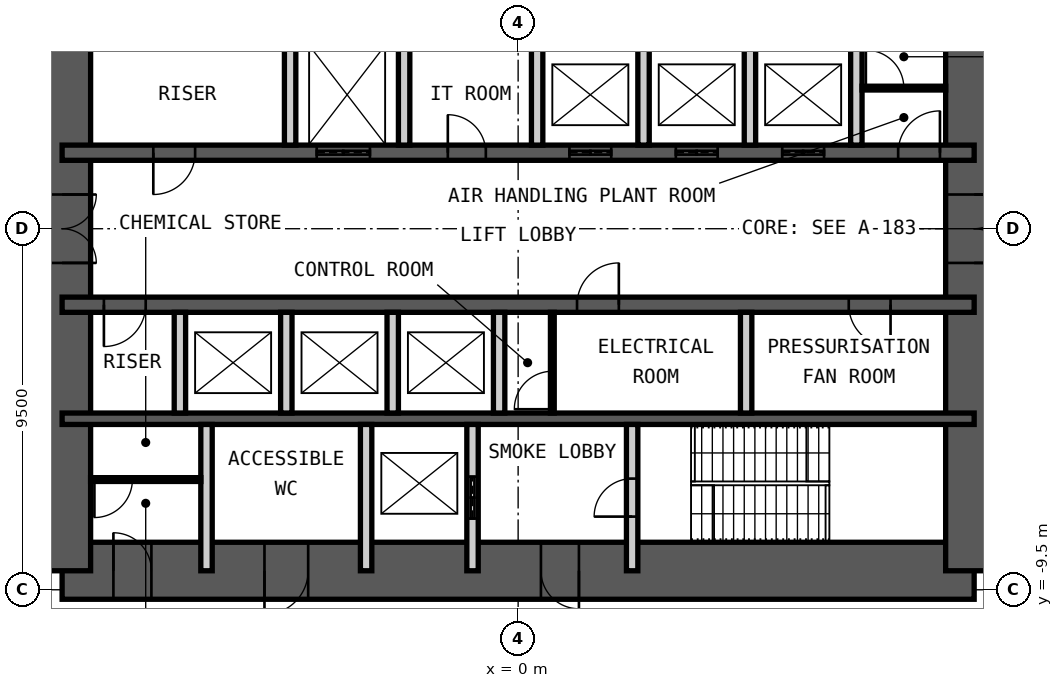
"""IFC4 building model, lengths in metres.
Left out: names, types, materials, properties, quantities, classifications, styles, units other than length and angle.
Written with IfcOpenShell. Run it as: python <this file> out.ifc"""

import sys

from ifc_helpers import new_model, si_unit, direction, frame, frame_2d, origin, place, context, subcontext, project, spatial, rectangle, extrude, element, fill, save


model = new_model("IFC4")
c1 = context("Model", 3, precision=1e-05, world=origin(), true_north=direction((0.0, 1.0)))
c2 = subcontext(c1, "Body", "Model", "MODEL_VIEW")
j1 = project(units=[si_unit("LENGTHUNIT", "METRE"), si_unit("PLANEANGLEUNIT", "RADIAN")], contexts=[c1])
p1 = place(None, origin())
s1 = spatial("IfcSite", under=j1, at=p1, CompositionType="ELEMENT")
p2 = place(p1, origin())
s2 = spatial("IfcBuilding", under=s1, at=p2, CompositionType="ELEMENT")
p3 = place(p2, frame((0.0, 0.0, 62.0)))
s3 = spatial("IfcBuildingStorey", under=s2, at=p3, CompositionType="ELEMENT", Elevation=62.0)
p4 = place(p3, frame((-12.0, -9.0, 0.0), z_axis=(0.0, 0.0, 1.0), x_axis=(1.0, 0.0, 0.0)))
e1 = element("IfcWall", 1, at=p4, inside=s3, PredefinedType="SHEAR", context=c2, shape_type="SweptSolid", body=[
    extrude(rectangle(XDim=24.0, YDim=1.5, at=frame_2d((12.0, 0.0))), origin(), (0.0, 0.0, 1.0), 5.0),
])
p5 = place(p4, frame((1.35, 0.0, 0.0)))
e2 = element("IfcOpeningElement", 2, at=p5, cuts=e1, PredefinedType="OPENING", context=c2, shape_type="SweptSolid", body=[
    extrude(rectangle(XDim=1.0, YDim=2.1, at=frame_2d((0.5, 1.05))), frame((0.0, 0.76, 0.0), z_axis=(0.0, -1.0, 0.0), x_axis=(1.0, 0.0, 0.0)), (0.0, 0.0, 1.0), 1.52),
])
p6 = place(p4, frame((5.325, 0.0, 0.0)))
e3 = element("IfcOpeningElement", 3, at=p6, cuts=e1, PredefinedType="OPENING", context=c2, shape_type="SweptSolid", body=[
    extrude(rectangle(XDim=1.15, YDim=2.1, at=frame_2d((0.575, 1.05))), frame((0.0, 0.76, 0.0), z_axis=(0.0, -1.0, 0.0), x_axis=(1.0, 0.0, 0.0)), (0.0, 0.0, 1.0), 1.52),
])
p7 = place(p4, frame((12.6, 0.0, 0.0)))
e4 = element("IfcOpeningElement", 4, at=p7, cuts=e1, PredefinedType="OPENING", context=c2, shape_type="SweptSolid", body=[
    extrude(rectangle(XDim=1.0, YDim=2.1, at=frame_2d((0.5, 1.05))), frame((0.0, 0.76, 0.0), z_axis=(0.0, -1.0, 0.0), x_axis=(1.0, 0.0, 0.0)), (0.0, 0.0, 1.0), 1.52),
])
p8 = place(p3, frame((12.0, -9.0, 0.0), z_axis=(0.0, 0.0, 1.0), x_axis=(0.0, 1.0, 0.0)))
e5 = element("IfcWall", 5, at=p8, inside=s3, PredefinedType="SHEAR", context=c2, shape_type="SweptSolid", body=[
    extrude(rectangle(XDim=18.0, YDim=1.5, at=frame_2d((9.0, 0.0))), origin(), (0.0, 0.0, 1.0), 5.0),
])
p9 = place(p8, frame((8.1, 0.0, 0.0)))
e6 = element("IfcOpeningElement", 6, at=p9, cuts=e5, PredefinedType="OPENING", context=c2, shape_type="SweptSolid", body=[
    extrude(rectangle(XDim=1.8, YDim=2.1, at=frame_2d((0.9, 1.05))), frame((0.0, 0.76, 0.0), z_axis=(0.0, -1.0, 0.0), x_axis=(1.0, 0.0, 0.0)), (0.0, 0.0, 1.0), 1.52),
])
p10 = place(p3, frame((-12.0, -9.0, 0.0), z_axis=(0.0, 0.0, 1.0), x_axis=(0.0, 1.0, 0.0)))
e7 = element("IfcWall", 7, at=p10, inside=s3, PredefinedType="SHEAR", context=c2, shape_type="SweptSolid", body=[
    extrude(rectangle(XDim=18.0, YDim=1.5, at=frame_2d((9.0, 0.0))), origin(), (0.0, 0.0, 1.0), 5.0),
])
p11 = place(p10, frame((8.1, 0.0, 0.0)))
e8 = element("IfcOpeningElement", 8, at=p11, cuts=e7, PredefinedType="OPENING", context=c2, shape_type="SweptSolid", body=[
    extrude(rectangle(XDim=1.8, YDim=2.1, at=frame_2d((0.9, 1.05))), frame((0.0, 0.76, 0.0), z_axis=(0.0, -1.0, 0.0), x_axis=(1.0, 0.0, 0.0)), (0.0, 0.0, 1.0), 1.52),
])
p12 = place(p3, frame((-12.0, 2.0, 0.0), z_axis=(0.0, 0.0, 1.0), x_axis=(1.0, 0.0, 0.0)))
e9 = element("IfcWall", 9, at=p12, inside=s3, PredefinedType="SHEAR", context=c2, shape_type="SweptSolid", body=[
    extrude(rectangle(XDim=24.0, YDim=0.4, at=frame_2d((12.0, 0.0))), origin(), (0.0, 0.0, 1.0), 5.0),
])
p13 = place(p12, frame((2.4, 0.0, 0.0)))
e10 = element("IfcOpeningElement", 10, at=p13, cuts=e9, PredefinedType="OPENING", context=c2, shape_type="SweptSolid", body=[
    extrude(rectangle(XDim=1.1, YDim=2.1, at=frame_2d((0.55, 1.05))), frame((0.0, 0.21, 0.0), z_axis=(0.0, -1.0, 0.0), x_axis=(1.0, 0.0, 0.0)), (0.0, 0.0, 1.0), 0.42),
])
p14 = place(p12, frame((22.0, 0.0, 0.0)))
e11 = element("IfcOpeningElement", 11, at=p14, cuts=e9, PredefinedType="OPENING", context=c2, shape_type="SweptSolid", body=[
    extrude(rectangle(XDim=1.1, YDim=2.1, at=frame_2d((0.55, 1.05))), frame((0.0, 0.21, 0.0), z_axis=(0.0, -1.0, 0.0), x_axis=(1.0, 0.0, 0.0)), (0.0, 0.0, 1.0), 0.42),
])
p15 = place(p12, frame((10.15, 0.0, 0.0)))
e12 = element("IfcOpeningElement", 12, at=p15, cuts=e9, PredefinedType="OPENING", context=c2, shape_type="SweptSolid", body=[
    extrude(rectangle(XDim=1.0, YDim=2.1, at=frame_2d((0.5, 1.05))), frame((0.0, 0.21, 0.0), z_axis=(0.0, -1.0, 0.0), x_axis=(1.0, 0.0, 0.0)), (0.0, 0.0, 1.0), 0.42),
])
p16 = place(p12, frame((6.7, 0.0, 0.0)))
e13 = element("IfcOpeningElement", 13, at=p16, cuts=e9, PredefinedType="OPENING", context=c2, shape_type="SweptSolid", body=[
    extrude(rectangle(XDim=1.4, YDim=2.4, at=frame_2d((0.7, 1.2))), frame((0.0, 0.21, 0.0), z_axis=(0.0, -1.0, 0.0), x_axis=(1.0, 0.0, 0.0)), (0.0, 0.0, 1.0), 0.42),
])
p17 = place(p12, frame((13.35, 0.0, 0.0)))
e14 = element("IfcOpeningElement", 14, at=p17, cuts=e9, PredefinedType="OPENING", context=c2, shape_type="SweptSolid", body=[
    extrude(rectangle(XDim=1.1, YDim=2.4, at=frame_2d((0.55, 1.2))), frame((0.0, 0.21, 0.0), z_axis=(0.0, -1.0, 0.0), x_axis=(1.0, 0.0, 0.0)), (0.0, 0.0, 1.0), 0.42),
])
p18 = place(p12, frame((16.15, 0.0, 0.0)))
e15 = element("IfcOpeningElement", 15, at=p18, cuts=e9, PredefinedType="OPENING", context=c2, shape_type="SweptSolid", body=[
    extrude(rectangle(XDim=1.1, YDim=2.4, at=frame_2d((0.55, 1.2))), frame((0.0, 0.21, 0.0), z_axis=(0.0, -1.0, 0.0), x_axis=(1.0, 0.0, 0.0)), (0.0, 0.0, 1.0), 0.42),
])
p19 = place(p12, frame((18.95, 0.0, 0.0)))
e16 = element("IfcOpeningElement", 16, at=p19, cuts=e9, PredefinedType="OPENING", context=c2, shape_type="SweptSolid", body=[
    extrude(rectangle(XDim=1.1, YDim=2.4, at=frame_2d((0.55, 1.2))), frame((0.0, 0.21, 0.0), z_axis=(0.0, -1.0, 0.0), x_axis=(1.0, 0.0, 0.0)), (0.0, 0.0, 1.0), 0.42),
])
p20 = place(p3, frame((-12.0, -2.0, 0.0), z_axis=(0.0, 0.0, 1.0), x_axis=(1.0, 0.0, 0.0)))
e17 = element("IfcWall", 17, at=p20, inside=s3, PredefinedType="SHEAR", context=c2, shape_type="SweptSolid", body=[
    extrude(rectangle(XDim=24.0, YDim=0.4, at=frame_2d((12.0, 0.0))), origin(), (0.0, 0.0, 1.0), 5.0),
])
p21 = place(p20, frame((1.1, 0.0, 0.0)))
e18 = element("IfcOpeningElement", 18, at=p21, cuts=e17, PredefinedType="OPENING", context=c2, shape_type="SweptSolid", body=[
    extrude(rectangle(XDim=1.1, YDim=2.1, at=frame_2d((0.55, 1.05))), frame((0.0, 0.21, 0.0), z_axis=(0.0, -1.0, 0.0), x_axis=(1.0, 0.0, 0.0)), (0.0, 0.0, 1.0), 0.42),
])
p22 = place(p20, frame((13.55, 0.0, 0.0)))
e19 = element("IfcOpeningElement", 19, at=p22, cuts=e17, PredefinedType="OPENING", context=c2, shape_type="SweptSolid", body=[
    extrude(rectangle(XDim=1.1, YDim=2.1, at=frame_2d((0.55, 1.05))), frame((0.0, 0.21, 0.0), z_axis=(0.0, -1.0, 0.0), x_axis=(1.0, 0.0, 0.0)), (0.0, 0.0, 1.0), 0.42),
])
p23 = place(p20, frame((20.7, 0.0, 0.0)))
e20 = element("IfcOpeningElement", 20, at=p23, cuts=e17, PredefinedType="OPENING", context=c2, shape_type="SweptSolid", body=[
    extrude(rectangle(XDim=1.1, YDim=2.1, at=frame_2d((0.55, 1.05))), frame((0.0, 0.21, 0.0), z_axis=(0.0, -1.0, 0.0), x_axis=(1.0, 0.0, 0.0)), (0.0, 0.0, 1.0), 0.42),
])
p24 = place(p3, frame((-12.0, -5.0, 0.0), z_axis=(0.0, 0.0, 1.0), x_axis=(1.0, 0.0, 0.0)))
e21 = element("IfcWall", 21, at=p24, inside=s3, PredefinedType="SHEAR", context=c2, shape_type="SweptSolid", body=[
    extrude(rectangle(XDim=24.0, YDim=0.3, at=frame_2d((12.0, 0.0))), origin(), (0.0, 0.0, 1.0), 5.0),
])
for number, where, z_axis, x_axis in (
    (22, (-6.0, 2.2, 0.0), (0.0, 0.0, 1.0), (0.0, 1.0, 0.0)),
    (23, (-3.0, 2.2, 0.0), (0.0, 0.0, 1.0), (0.0, 1.0, 0.0)),
    (24, (0.5, 2.2, 0.0), (0.0, 0.0, 1.0), (0.0, 1.0, 0.0)),
    (25, (3.3, 2.2, 0.0), (0.0, 0.0, 1.0), (0.0, 1.0, 0.0)),
    (26, (6.1, 2.2, 0.0), (0.0, 0.0, 1.0), (0.0, 1.0, 0.0)),
    (27, (8.9, 2.2, 0.0), (0.0, 0.0, 1.0), (0.0, 1.0, 0.0)),
    (28, (-8.9, -4.85, 0.0), (0.0, 0.0, 1.0), (0.0, 1.0, 0.0)),
    (29, (-6.1, -4.85, 0.0), (0.0, 0.0, 1.0), (0.0, 1.0, 0.0)),
    (30, (-3.3, -4.85, 0.0), (0.0, 0.0, 1.0), (0.0, 1.0, 0.0)),
    (31, (-0.5, -4.85, 0.0), (0.0, 0.0, 1.0), (0.0, 1.0, 0.0)),
    (32, (6.0, -4.85, 0.0), (0.0, 0.0, 1.0), (0.0, 1.0, 0.0)),
):
    element("IfcWall", number, at=place(p3, frame(where, z_axis=z_axis, x_axis=x_axis)), inside=s3, PredefinedType="PARTITIONING", context=c2, shape_type="SweptSolid", body=[
        extrude(rectangle(XDim=2.65, YDim=0.3, at=frame_2d((1.325, 0.0))), origin(), (0.0, 0.0, 1.0), 4.78),
    ])
for number, where, z_axis, x_axis in (
    (33, (-8.2, -9.0, 0.0), (0.0, 0.0, 1.0), (0.0, 1.0, 0.0)),
    (34, (-4.0, -9.0, 0.0), (0.0, 0.0, 1.0), (0.0, 1.0, 0.0)),
):
    element("IfcWall", number, at=place(p3, frame(where, z_axis=z_axis, x_axis=x_axis)), inside=s3, PredefinedType="PARTITIONING", context=c2, shape_type="SweptSolid", body=[
        extrude(rectangle(XDim=3.85, YDim=0.3, at=frame_2d((1.925, 0.0))), origin(), (0.0, 0.0, 1.0), 4.78),
    ])
p25 = place(p3, frame((-1.2, -9.0, 0.0), z_axis=(0.0, 0.0, 1.0), x_axis=(0.0, 1.0, 0.0)))
e35 = element("IfcWall", 35, at=p25, inside=s3, PredefinedType="PARTITIONING", context=c2, shape_type="SweptSolid", body=[
    extrude(rectangle(XDim=3.85, YDim=0.3, at=frame_2d((1.925, 0.0))), origin(), (0.0, 0.0, 1.0), 4.78),
])
p26 = place(p25, frame((1.375, 0.0, 0.0)))
e36 = element("IfcOpeningElement", 36, at=p26, cuts=e35, PredefinedType="OPENING", context=c2, shape_type="SweptSolid", body=[
    extrude(rectangle(XDim=1.1, YDim=2.4, at=frame_2d((0.55, 1.2))), frame((0.0, 0.16, 0.0), z_axis=(0.0, -1.0, 0.0), x_axis=(1.0, 0.0, 0.0)), (0.0, 0.0, 1.0), 0.32),
])
p27 = place(p3, frame((3.0, -9.0, 0.0), z_axis=(0.0, 0.0, 1.0), x_axis=(0.0, 1.0, 0.0)))
e37 = element("IfcWall", 37, at=p27, inside=s3, PredefinedType="PARTITIONING", context=c2, shape_type="SweptSolid", body=[
    extrude(rectangle(XDim=3.85, YDim=0.3, at=frame_2d((1.925, 0.0))), origin(), (0.0, 0.0, 1.0), 4.78),
])
p28 = place(p27, frame((1.425, 0.0, 0.0)))
e38 = element("IfcOpeningElement", 38, at=p28, cuts=e37, PredefinedType="OPENING", context=c2, shape_type="SweptSolid", body=[
    extrude(rectangle(XDim=1.0, YDim=2.1, at=frame_2d((0.5, 1.05))), frame((0.0, 0.16, 0.0), z_axis=(0.0, -1.0, 0.0), x_axis=(1.0, 0.0, 0.0)), (0.0, 0.0, 1.0), 0.32),
])
p29 = place(p3, frame((0.9, -4.85, 0.0), z_axis=(0.0, 0.0, 1.0), x_axis=(0.0, 1.0, 0.0)))
e39 = element("IfcWall", 39, at=p29, inside=s3, PredefinedType="PARTITIONING", context=c2, shape_type="SweptSolid", body=[
    extrude(rectangle(XDim=2.65, YDim=0.1, at=frame_2d((1.325, 0.0))), origin(), (0.0, 0.0, 1.0), 4.78),
])
p30 = place(p29, frame((0.1, 0.0, 0.0)))
e40 = element("IfcOpeningElement", 40, at=p30, cuts=e39, PredefinedType="OPENING", context=c2, shape_type="SweptSolid", body=[
    extrude(rectangle(XDim=1.0, YDim=2.4, at=frame_2d((0.5, 1.2))), frame((0.0, 0.06, 0.0), z_axis=(0.0, -1.0, 0.0), x_axis=(1.0, 0.0, 0.0)), (0.0, 0.0, 1.0), 0.12),
])
p31 = place(p3, frame((-11.25, -6.6, 0.0), z_axis=(0.0, 0.0, 1.0), x_axis=(1.0, 0.0, 0.0)))
e41 = element("IfcWall", 41, at=p31, inside=s3, PredefinedType="PARTITIONING", context=c2, shape_type="SweptSolid", body=[
    extrude(rectangle(XDim=2.9, YDim=0.1, at=frame_2d((1.45, 0.0))), origin(), (0.0, 0.0, 1.0), 4.78),
])
p32 = place(p31, frame((0.1, 0.0, 0.0)))
e42 = element("IfcOpeningElement", 42, at=p32, cuts=e41, PredefinedType="OPENING", context=c2, shape_type="SweptSolid", body=[
    extrude(rectangle(XDim=1.0, YDim=2.4, at=frame_2d((0.5, 1.2))), frame((0.0, 0.06, 0.0), z_axis=(0.0, -1.0, 0.0), x_axis=(1.0, 0.0, 0.0)), (0.0, 0.0, 1.0), 0.12),
])
p33 = place(p3, frame((9.05, 3.7, 0.0), z_axis=(0.0, 0.0, 1.0), x_axis=(1.0, 0.0, 0.0)))
e43 = element("IfcWall", 43, at=p33, inside=s3, PredefinedType="PARTITIONING", context=c2, shape_type="SweptSolid", body=[
    extrude(rectangle(XDim=2.2, YDim=0.1, at=frame_2d((1.1, 0.0))), origin(), (0.0, 0.0, 1.0), 4.78),
])
p34 = place(p33, frame((0.1, 0.0, 0.0)))
e44 = element("IfcOpeningElement", 44, at=p34, cuts=e43, PredefinedType="OPENING", context=c2, shape_type="SweptSolid", body=[
    extrude(rectangle(XDim=1.0, YDim=2.4, at=frame_2d((0.5, 1.2))), frame((0.0, 0.06, 0.0), z_axis=(0.0, -1.0, 0.0), x_axis=(1.0, 0.0, 0.0)), (0.0, 0.0, 1.0), 0.12),
])
p35 = place(p5, origin())
e45 = element("IfcDoor", 45, at=p35, inside=s3, OperationType="SINGLE_SWING_RIGHT", PredefinedType="DOOR", context=c2, shape_type="SweptSolid", body=[
    extrude(rectangle(XDim=1.0, YDim=2.1, at=frame_2d((0.5, 1.05))), frame((0.0, 0.025, 0.0), z_axis=(0.0, -1.0, 0.0), x_axis=(1.0, 0.0, 0.0)), (0.0, 0.0, 1.0), 0.05),
])
fill(e2, e45)
p36 = place(p6, origin())
e46 = element("IfcDoor", 46, at=p36, inside=s3, OperationType="SINGLE_SWING_LEFT", PredefinedType="DOOR", context=c2, shape_type="SweptSolid", body=[
    extrude(rectangle(XDim=1.15, YDim=2.1, at=frame_2d((0.575, 1.05))), frame((0.0, 0.025, 0.0), z_axis=(0.0, -1.0, 0.0), x_axis=(1.0, 0.0, 0.0)), (0.0, 0.0, 1.0), 0.05),
])
fill(e3, e46)
p37 = place(p7, origin())
e47 = element("IfcDoor", 47, at=p37, inside=s3, OperationType="SINGLE_SWING_RIGHT", PredefinedType="DOOR", context=c2, shape_type="SweptSolid", body=[
    extrude(rectangle(XDim=1.0, YDim=2.1, at=frame_2d((0.5, 1.05))), frame((0.0, 0.025, 0.0), z_axis=(0.0, -1.0, 0.0), x_axis=(1.0, 0.0, 0.0)), (0.0, 0.0, 1.0), 0.05),
])
fill(e4, e47)
p38 = place(p28, origin())
e48 = element("IfcDoor", 48, at=p38, inside=s3, OperationType="SINGLE_SWING_RIGHT", PredefinedType="DOOR", context=c2, shape_type="SweptSolid", body=[
    extrude(rectangle(XDim=1.0, YDim=2.1, at=frame_2d((0.5, 1.05))), frame((0.0, 0.025, 0.0), z_axis=(0.0, -1.0, 0.0), x_axis=(1.0, 0.0, 0.0)), (0.0, 0.0, 1.0), 0.05),
])
fill(e38, e48)
p39 = place(p13, origin())
e49 = element("IfcDoor", 49, at=p39, inside=s3, OperationType="SINGLE_SWING_LEFT", PredefinedType="DOOR", context=c2, shape_type="SweptSolid", body=[
    extrude(rectangle(XDim=1.1, YDim=2.1, at=frame_2d((0.55, 1.05))), frame((0.0, 0.025, 0.0), z_axis=(0.0, -1.0, 0.0), x_axis=(1.0, 0.0, 0.0)), (0.0, 0.0, 1.0), 0.05),
])
fill(e10, e49)
p40 = place(p21, origin())
e50 = element("IfcDoor", 50, at=p40, inside=s3, OperationType="SINGLE_SWING_LEFT", PredefinedType="DOOR", context=c2, shape_type="SweptSolid", body=[
    extrude(rectangle(XDim=1.1, YDim=2.1, at=frame_2d((0.55, 1.05))), frame((0.0, 0.025, 0.0), z_axis=(0.0, -1.0, 0.0), x_axis=(1.0, 0.0, 0.0)), (0.0, 0.0, 1.0), 0.05),
])
fill(e18, e50)
p41 = place(p14, origin())
e51 = element("IfcDoor", 51, at=p41, inside=s3, OperationType="SINGLE_SWING_LEFT", PredefinedType="DOOR", context=c2, shape_type="SweptSolid", body=[
    extrude(rectangle(XDim=1.1, YDim=2.1, at=frame_2d((0.55, 1.05))), frame((0.0, 0.025, 0.0), z_axis=(0.0, -1.0, 0.0), x_axis=(1.0, 0.0, 0.0)), (0.0, 0.0, 1.0), 0.05),
])
fill(e11, e51)
p42 = place(p15, origin())
e52 = element("IfcDoor", 52, at=p42, inside=s3, OperationType="SINGLE_SWING_RIGHT", PredefinedType="DOOR", context=c2, shape_type="SweptSolid", body=[
    extrude(rectangle(XDim=1.0, YDim=2.1, at=frame_2d((0.5, 1.05))), frame((0.0, 0.025, 0.0), z_axis=(0.0, -1.0, 0.0), x_axis=(1.0, 0.0, 0.0)), (0.0, 0.0, 1.0), 0.05),
])
fill(e12, e52)
p43 = place(p22, origin())
e53 = element("IfcDoor", 53, at=p43, inside=s3, OperationType="SINGLE_SWING_LEFT", PredefinedType="DOOR", context=c2, shape_type="SweptSolid", body=[
    extrude(rectangle(XDim=1.1, YDim=2.1, at=frame_2d((0.55, 1.05))), frame((0.0, 0.025, 0.0), z_axis=(0.0, -1.0, 0.0), x_axis=(1.0, 0.0, 0.0)), (0.0, 0.0, 1.0), 0.05),
])
fill(e19, e53)
p44 = place(p23, origin())
e54 = element("IfcDoor", 54, at=p44, inside=s3, OperationType="SINGLE_SWING_RIGHT", PredefinedType="DOOR", context=c2, shape_type="SweptSolid", body=[
    extrude(rectangle(XDim=1.1, YDim=2.1, at=frame_2d((0.55, 1.05))), frame((0.0, 0.025, 0.0), z_axis=(0.0, -1.0, 0.0), x_axis=(1.0, 0.0, 0.0)), (0.0, 0.0, 1.0), 0.05),
])
fill(e20, e54)
p45 = place(p9, origin())
e55 = element("IfcDoor", 55, at=p45, inside=s3, OperationType="DOUBLE_DOOR_DOUBLE_SWING", PredefinedType="DOOR", context=c2, shape_type="SweptSolid", body=[
    extrude(rectangle(XDim=1.8, YDim=2.1, at=frame_2d((0.9, 1.05))), frame((0.0, 0.025, 0.0), z_axis=(0.0, -1.0, 0.0), x_axis=(1.0, 0.0, 0.0)), (0.0, 0.0, 1.0), 0.05),
])
fill(e6, e55)
p46 = place(p11, origin())
e56 = element("IfcDoor", 56, at=p46, inside=s3, OperationType="DOUBLE_DOOR_DOUBLE_SWING", PredefinedType="DOOR", context=c2, shape_type="SweptSolid", body=[
    extrude(rectangle(XDim=1.8, YDim=2.1, at=frame_2d((0.9, 1.05))), frame((0.0, 0.025, 0.0), z_axis=(0.0, -1.0, 0.0), x_axis=(1.0, 0.0, 0.0)), (0.0, 0.0, 1.0), 0.05),
])
fill(e8, e56)
p47 = place(p26, origin())
e57 = element("IfcDoor", 57, at=p47, inside=s3, OperationType="DOUBLE_DOOR_SLIDING", PredefinedType="DOOR", context=c2, shape_type="SweptSolid", body=[
    extrude(rectangle(XDim=1.1, YDim=2.4, at=frame_2d((0.55, 1.2))), frame((0.0, 0.025, 0.0), z_axis=(0.0, -1.0, 0.0), x_axis=(1.0, 0.0, 0.0)), (0.0, 0.0, 1.0), 0.05),
])
fill(e36, e57)
p48 = place(p16, origin())
e58 = element("IfcDoor", 58, at=p48, inside=s3, OperationType="DOUBLE_DOOR_SLIDING", PredefinedType="DOOR", context=c2, shape_type="SweptSolid", body=[
    extrude(rectangle(XDim=1.4, YDim=2.4, at=frame_2d((0.7, 1.2))), frame((0.0, 0.025, 0.0), z_axis=(0.0, -1.0, 0.0), x_axis=(1.0, 0.0, 0.0)), (0.0, 0.0, 1.0), 0.05),
])
fill(e13, e58)
p49 = place(p17, origin())
e59 = element("IfcDoor", 59, at=p49, inside=s3, OperationType="DOUBLE_DOOR_SLIDING", PredefinedType="DOOR", context=c2, shape_type="SweptSolid", body=[
    extrude(rectangle(XDim=1.1, YDim=2.4, at=frame_2d((0.55, 1.2))), frame((0.0, 0.025, 0.0), z_axis=(0.0, -1.0, 0.0), x_axis=(1.0, 0.0, 0.0)), (0.0, 0.0, 1.0), 0.05),
])
fill(e14, e59)
p50 = place(p18, origin())
e60 = element("IfcDoor", 60, at=p50, inside=s3, OperationType="DOUBLE_DOOR_SLIDING", PredefinedType="DOOR", context=c2, shape_type="SweptSolid", body=[
    extrude(rectangle(XDim=1.1, YDim=2.4, at=frame_2d((0.55, 1.2))), frame((0.0, 0.025, 0.0), z_axis=(0.0, -1.0, 0.0), x_axis=(1.0, 0.0, 0.0)), (0.0, 0.0, 1.0), 0.05),
])
fill(e15, e60)
p51 = place(p19, origin())
e61 = element("IfcDoor", 61, at=p51, inside=s3, OperationType="DOUBLE_DOOR_SLIDING", PredefinedType="DOOR", context=c2, shape_type="SweptSolid", body=[
    extrude(rectangle(XDim=1.1, YDim=2.4, at=frame_2d((0.55, 1.2))), frame((0.0, 0.025, 0.0), z_axis=(0.0, -1.0, 0.0), x_axis=(1.0, 0.0, 0.0)), (0.0, 0.0, 1.0), 0.05),
])
fill(e16, e61)
p52 = place(p30, origin())
e62 = element("IfcDoor", 62, at=p52, inside=s3, OperationType="SINGLE_SWING_RIGHT", PredefinedType="DOOR", context=c2, shape_type="SweptSolid", body=[
    extrude(rectangle(XDim=1.0, YDim=2.4, at=frame_2d((0.5, 1.2))), frame((0.0, 0.025, 0.0), z_axis=(0.0, -1.0, 0.0), x_axis=(1.0, 0.0, 0.0)), (0.0, 0.0, 1.0), 0.05),
])
fill(e40, e62)
p53 = place(p32, origin())
e63 = element("IfcDoor", 63, at=p53, inside=s3, OperationType="SINGLE_SWING_LEFT", PredefinedType="DOOR", context=c2, shape_type="SweptSolid", body=[
    extrude(rectangle(XDim=1.0, YDim=2.4, at=frame_2d((0.5, 1.2))), frame((0.0, 0.025, 0.0), z_axis=(0.0, -1.0, 0.0), x_axis=(1.0, 0.0, 0.0)), (0.0, 0.0, 1.0), 0.05),
])
fill(e42, e63)
p54 = place(p34, origin())
e64 = element("IfcDoor", 64, at=p54, inside=s3, OperationType="SINGLE_SWING_RIGHT", PredefinedType="DOOR", context=c2, shape_type="SweptSolid", body=[
    extrude(rectangle(XDim=1.0, YDim=2.4, at=frame_2d((0.5, 1.2))), frame((0.0, 0.025, 0.0), z_axis=(0.0, -1.0, 0.0), x_axis=(1.0, 0.0, 0.0)), (0.0, 0.0, 1.0), 0.05),
])
fill(e44, e64)
save(model, sys.argv[1])
